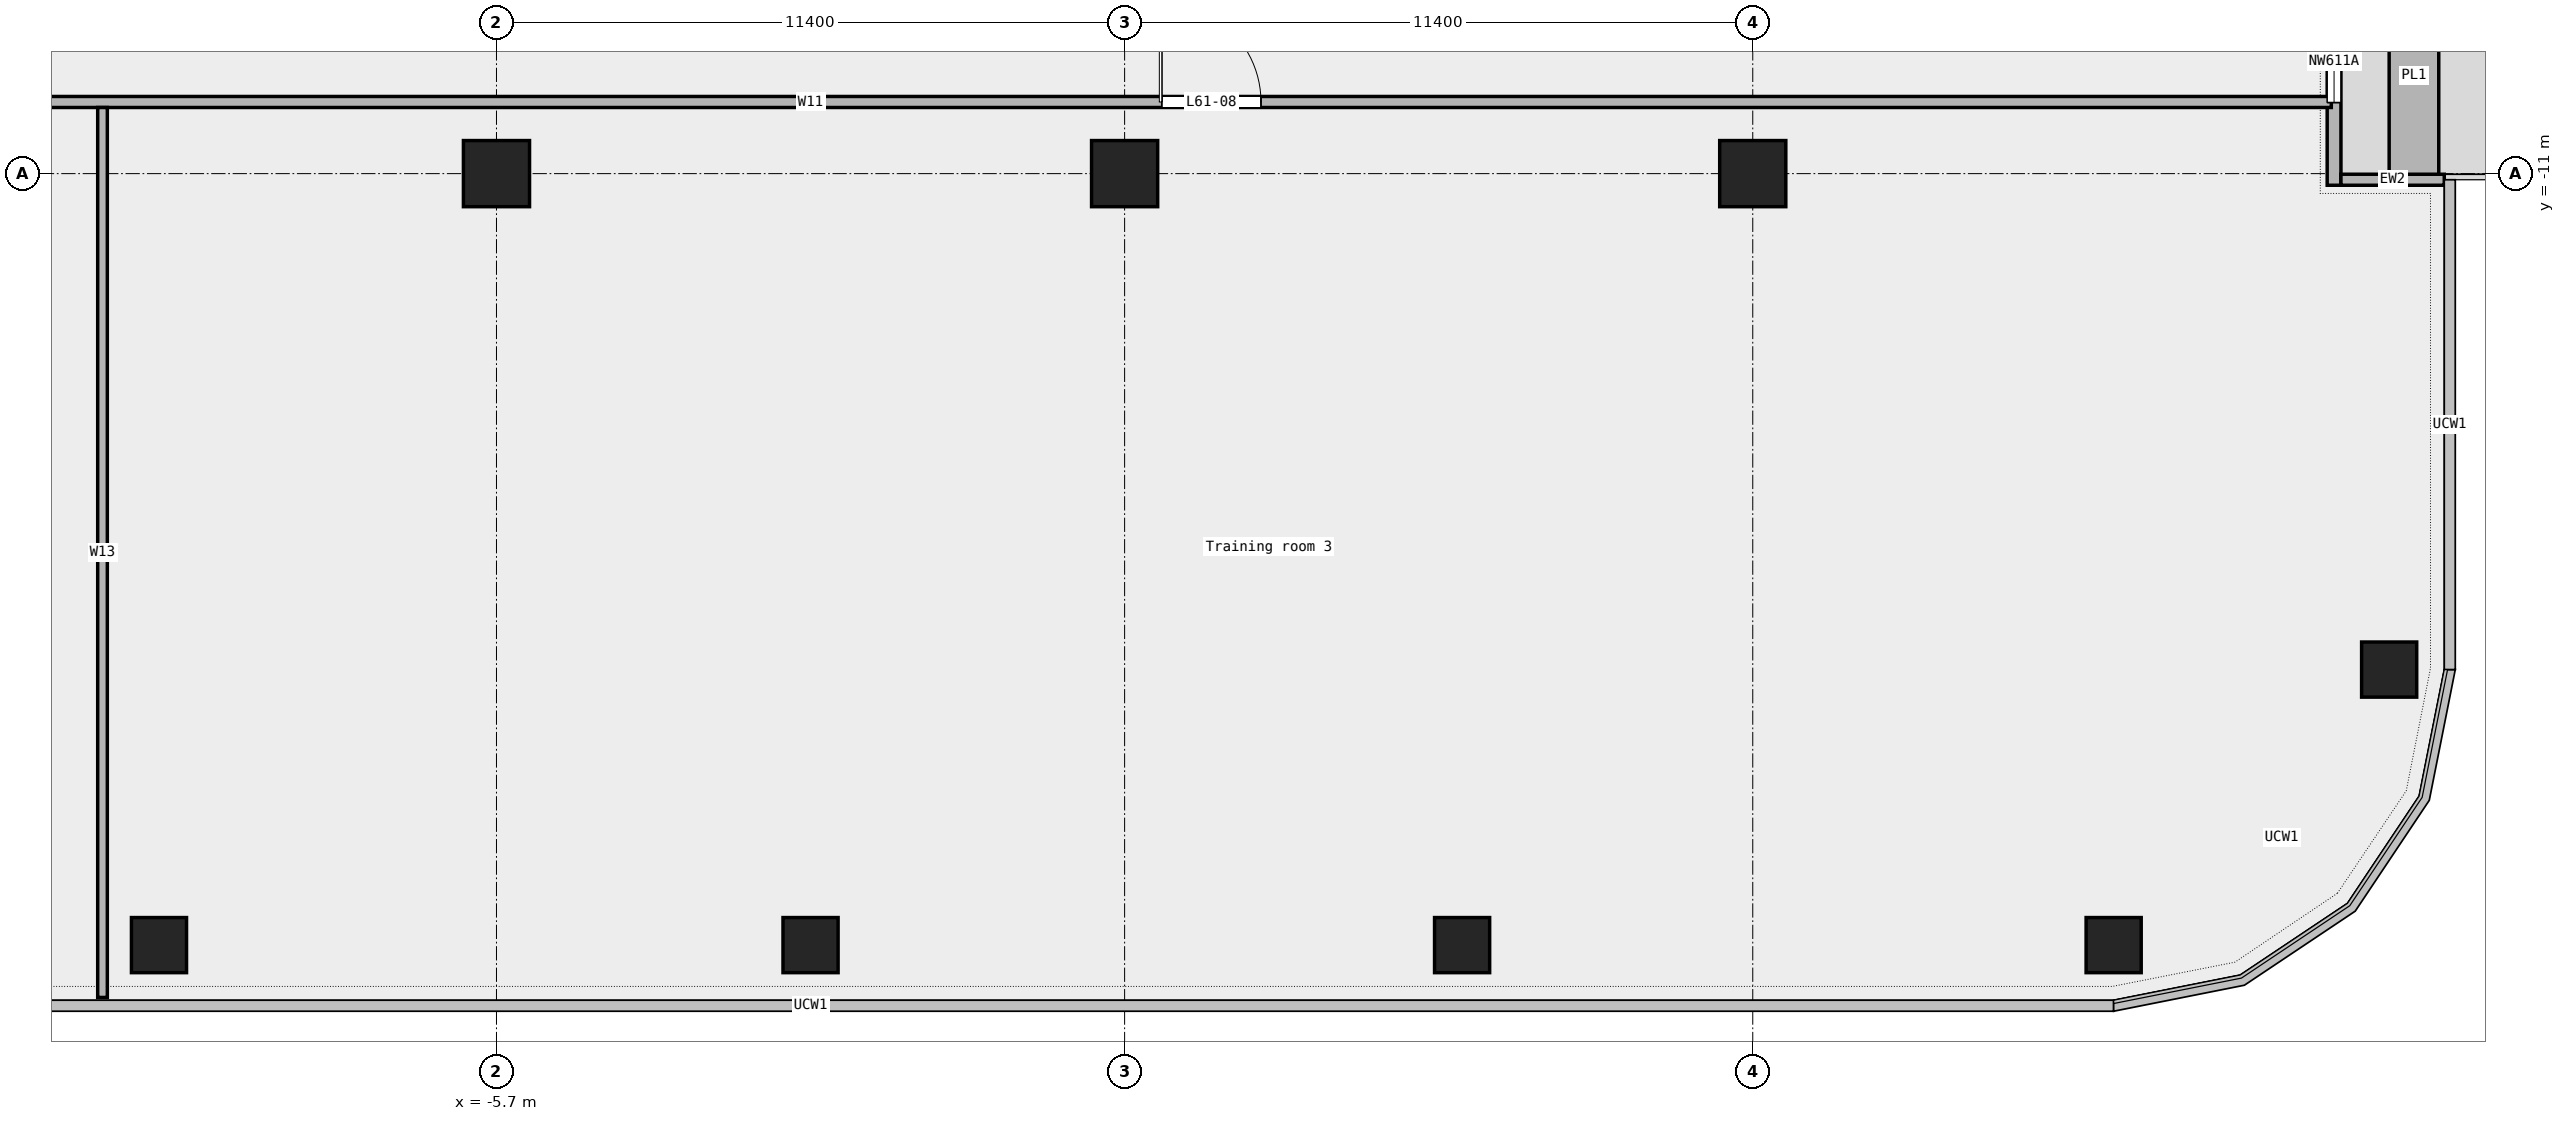
"""IFC4 building model, lengths in metres.
Left out: names, types, materials, properties, quantities, classifications, styles, units other than length and angle.
Written with IfcOpenShell. Run it as: python <this file> out.ifc"""

import sys

from ifc_helpers import new_model, si_unit, direction, frame, frame_2d, origin, origin_2d, place, context, subcontext, project, spatial, rectangle, extrude, element, fill, save


model = new_model("IFC4")
c1 = context("Model", 3, precision=1e-05, world=origin(), true_north=direction((0.0, 1.0)))
c2 = subcontext(c1, "Body", "Model", "MODEL_VIEW")
j1 = project(units=[si_unit("LENGTHUNIT", "METRE"), si_unit("PLANEANGLEUNIT", "RADIAN")], contexts=[c1])
p1 = place(None, origin())
s1 = spatial("IfcSite", under=j1, at=p1, CompositionType="ELEMENT")
p2 = place(p1, origin())
s2 = spatial("IfcBuilding", under=s1, at=p2, CompositionType="ELEMENT")
p3 = place(p2, frame((0.0, 0.0, 283.4)))
s3 = spatial("IfcBuildingStorey", under=s2, at=p3, CompositionType="ELEMENT", Elevation=283.4)
for number, where, z_axis, x_axis in (
    (1, (-11.825, -25.0, 0.0), (0.0, 0.0, 1.0), (1.0, 0.0, 0.0)),
    (2, (0.0, -25.0, 0.0), (0.0, 0.0, 1.0), (1.0, 0.0, 0.0)),
    (3, (11.825, -25.0, 0.0), (0.0, 0.0, 1.0), (1.0, 0.0, 0.0)),
    (4, (23.65, -25.0, 0.0), (0.0, 0.0, 1.0), (1.0, 0.0, 0.0)),
    (5, (28.65, -20.0, 0.0), (0.0, 0.0, 1.0), (1.0, 0.0, 0.0)),
):
    element("IfcColumn", number, at=place(p3, frame(where, z_axis=z_axis, x_axis=x_axis)), inside=s3, PredefinedType="COLUMN", context=c2, shape_type="SweptSolid", body=[
        extrude(rectangle(XDim=1.0, YDim=1.0, at=origin_2d()), origin(), (0.0, 0.0, 1.0), 3.6),
    ])
for number, where, z_axis, x_axis in (
    (6, (-5.7, -11.0, 0.0), (0.0, 0.0, 1.0), (1.0, 0.0, 0.0)),
    (7, (5.7, -11.0, 0.0), (0.0, 0.0, 1.0), (1.0, 0.0, 0.0)),
    (8, (17.1, -11.0, 0.0), (0.0, 0.0, 1.0), (1.0, 0.0, 0.0)),
):
    element("IfcColumn", number, at=place(p3, frame(where, z_axis=z_axis, x_axis=x_axis)), inside=s3, PredefinedType="COLUMN", context=c2, shape_type="SweptSolid", body=[
        extrude(rectangle(XDim=1.2, YDim=1.2, at=origin_2d()), origin(), (0.0, 0.0, 1.0), 3.6),
    ])
p4 = place(p3, frame((27.65, -11.211, 0.0), z_axis=(0.0, 0.0, 1.0), x_axis=(0.0, 1.0, 0.0)))
e9 = element("IfcWall", 9, at=p4, inside=s3, PredefinedType="STANDARD", context=c2, shape_type="SweptSolid", body=[
    extrude(rectangle(XDim=13.533, YDim=0.25, at=frame_2d((6.767, 0.0))), origin(), (0.0, 0.0, 1.0), 3.6),
])
p5 = place(p4, frame((1.5, 0.0, 0.45)))
e10 = element("IfcOpeningElement", 10, at=p5, cuts=e9, PredefinedType="OPENING", context=c2, shape_type="SweptSolid", body=[
    extrude(rectangle(XDim=1.5, YDim=2.4, at=frame_2d((0.75, 1.2))), frame((0.0, 0.137, 0.0), z_axis=(0.0, -1.0, 0.0), x_axis=(1.0, 0.0, 0.0)), (0.0, 0.0, 1.0), 0.274),
])
p6 = place(p4, frame((5.75, 0.0, 0.0)))
e11 = element("IfcOpeningElement", 11, at=p6, cuts=e9, PredefinedType="OPENING", context=c2, shape_type="SweptSolid", body=[
    extrude(rectangle(XDim=1.8, YDim=2.4, at=frame_2d((0.9, 1.2))), frame((0.0, 0.137, 0.0), z_axis=(0.0, -1.0, 0.0), x_axis=(1.0, 0.0, 0.0)), (0.0, 0.0, 1.0), 0.274),
])
p7 = place(p4, frame((10.5, 0.0, 0.45)))
e12 = element("IfcOpeningElement", 12, at=p7, cuts=e9, PredefinedType="OPENING", context=c2, shape_type="SweptSolid", body=[
    extrude(rectangle(XDim=1.5, YDim=2.4, at=frame_2d((0.75, 1.2))), frame((0.0, 0.137, 0.0), z_axis=(0.0, -1.0, 0.0), x_axis=(1.0, 0.0, 0.0)), (0.0, 0.0, 1.0), 0.274),
])
p8 = place(p3, frame((29.65, -11.111, 0.0), z_axis=(0.0, 0.0, 1.0), x_axis=(-1.0, 0.0, 0.0)))
e13 = element("IfcWall", 13, at=p8, inside=s3, PredefinedType="STANDARD", context=c2, shape_type="SweptSolid", body=[
    extrude(rectangle(XDim=1.875, YDim=0.2, at=frame_2d((0.938, 0.0))), origin(), (0.0, 0.0, 1.0), 3.6),
])
p9 = place(p3, frame((29.1, -11.011, 0.0), z_axis=(0.0, 0.0, 1.0), x_axis=(0.0, 1.0, 0.0)))
e14 = element("IfcWall", 14, at=p9, inside=s3, PredefinedType="STANDARD", context=c2, shape_type="SweptSolid", body=[
    extrude(rectangle(XDim=3.6, YDim=0.9, at=frame_2d((1.8, 0.0))), origin(), (0.0, 0.0, 1.0), 0.7),
])
p10 = place(p3, frame((-27.6, -9.7, 0.0), z_axis=(0.0, 0.0, 1.0), x_axis=(1.0, 0.0, 0.0)))
e15 = element("IfcWall", 15, at=p10, inside=s3, PredefinedType="PARTITIONING", context=c2, shape_type="SweptSolid", body=[
    extrude(rectangle(XDim=55.2, YDim=0.2, at=frame_2d((27.6, 0.0))), origin(), (0.0, 0.0, 1.0), 3.6),
])
p11 = place(p10, frame((6.575, 0.0, 0.0)))
e16 = element("IfcOpeningElement", 16, at=p11, cuts=e15, PredefinedType="OPENING", context=c2, shape_type="SweptSolid", body=[
    extrude(rectangle(XDim=1.8, YDim=2.1, at=frame_2d((0.9, 1.05))), frame((0.0, 0.112, 0.0), z_axis=(0.0, -1.0, 0.0), x_axis=(1.0, 0.0, 0.0)), (0.0, 0.0, 1.0), 0.224),
])
p12 = place(p10, frame((33.975, 0.0, 0.0)))
e17 = element("IfcOpeningElement", 17, at=p12, cuts=e15, PredefinedType="OPENING", context=c2, shape_type="SweptSolid", body=[
    extrude(rectangle(XDim=1.8, YDim=2.1, at=frame_2d((0.9, 1.05))), frame((0.0, 0.112, 0.0), z_axis=(0.0, -1.0, 0.0), x_axis=(1.0, 0.0, 0.0)), (0.0, 0.0, 1.0), 0.224),
])
p13 = place(p3, frame((-12.85, -25.95, 0.0), z_axis=(0.0, 0.0, 1.0), x_axis=(0.0, 1.0, 0.0)))
e18 = element("IfcWall", 18, at=p13, inside=s3, PredefinedType="PARTITIONING", context=c2, shape_type="SweptSolid", body=[
    extrude(rectangle(XDim=16.15, YDim=0.175, at=frame_2d((8.075, 0.0))), origin(), (0.0, 0.0, 1.0), 3.6),
])
p14 = place(p5, origin())
e19 = element("IfcWindow", 19, at=p14, inside=s3, PartitioningType="SINGLE_PANEL", PredefinedType="WINDOW", context=c2, shape_type="SweptSolid", body=[
    extrude(rectangle(XDim=1.5, YDim=2.4, at=frame_2d((0.75, 1.2))), frame((0.0, 0.03, 0.0), z_axis=(0.0, -1.0, 0.0), x_axis=(1.0, 0.0, 0.0)), (0.0, 0.0, 1.0), 0.06),
])
fill(e10, e19)
p15 = place(p12, origin())
e20 = element("IfcDoor", 20, at=p15, inside=s3, OperationType="DOUBLE_DOOR_SINGLE_SWING", PredefinedType="DOOR", context=c2, shape_type="SweptSolid", body=[
    extrude(rectangle(XDim=1.8, YDim=2.1, at=frame_2d((0.9, 1.05))), frame((0.0, 0.025, 0.0), z_axis=(0.0, -1.0, 0.0), x_axis=(1.0, 0.0, 0.0)), (0.0, 0.0, 1.0), 0.05),
])
fill(e17, e20)
save(model, sys.argv[1])
